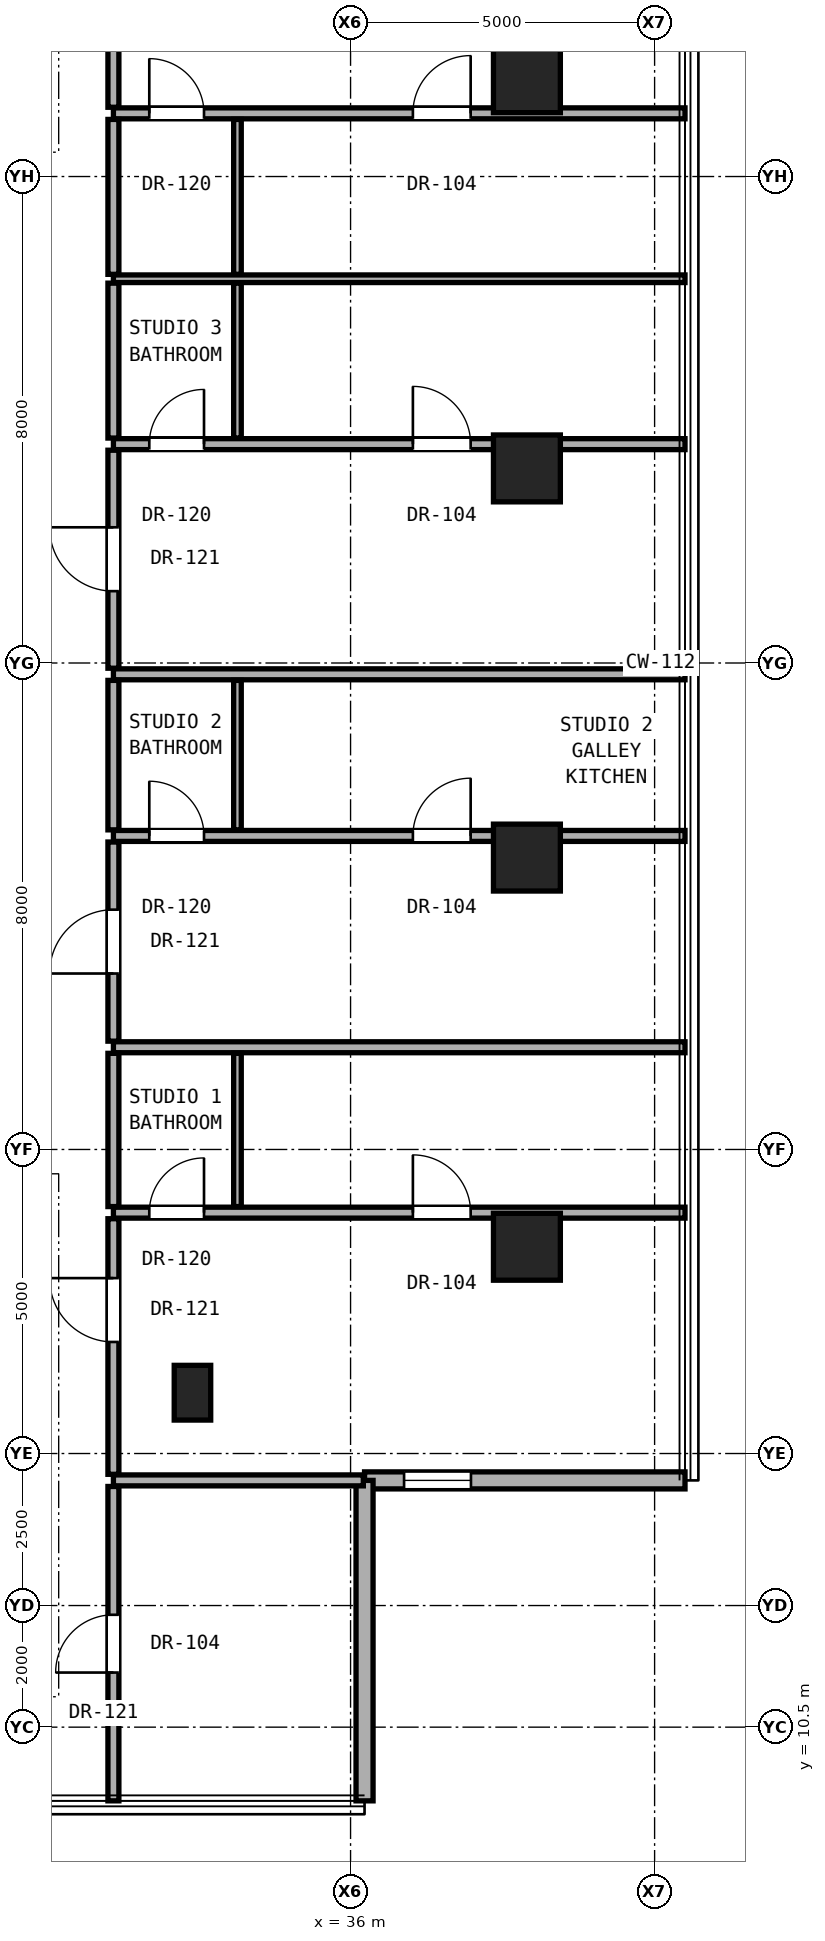
"""IFC4 building model, lengths in metres.
Left out: names, types, materials, properties, quantities, classifications, styles, units other than length and angle.
Written with IfcOpenShell. Run it as: python <this file> out.ifc"""

import sys

from ifc_helpers import new_model, si_unit, direction, frame, frame_2d, origin, origin_2d, place, context, subcontext, project, spatial, rectangle, hollow_rectangle, extrude, element, fill, save


model = new_model("IFC4")
c1 = context("Model", 3, precision=1e-05, world=origin(), true_north=direction((0.0, 1.0)))
c2 = subcontext(c1, "Body", "Model", "MODEL_VIEW")
j1 = project(units=[si_unit("LENGTHUNIT", "METRE"), si_unit("PLANEANGLEUNIT", "RADIAN")], contexts=[c1])
p1 = place(None, origin())
s1 = spatial("IfcSite", under=j1, at=p1, CompositionType="ELEMENT")
p2 = place(p1, origin())
s2 = spatial("IfcBuilding", under=s1, at=p2, CompositionType="ELEMENT")
p3 = place(p2, frame((0.0, 0.0, 131.3)))
s3 = spatial("IfcBuildingStorey", under=s2, at=p3, CompositionType="ELEMENT", Elevation=131.3)
for number, where, z_axis, x_axis in (
    (1, (38.9, 18.4, 0.0), (0.0, 0.0, 1.0), (1.0, 0.0, 0.0)),
    (2, (38.9, 24.8, 0.0), (0.0, 0.0, 1.0), (1.0, 0.0, 0.0)),
    (3, (38.9, 31.2, 0.0), (0.0, 0.0, 1.0), (1.0, 0.0, 0.0)),
    (4, (38.9, 37.6, 0.0), (0.0, 0.0, 1.0), (1.0, 0.0, 0.0)),
):
    element("IfcColumn", number, at=place(p3, frame(where, z_axis=z_axis, x_axis=x_axis)), inside=s3, PredefinedType="COLUMN", context=c2, shape_type="SweptSolid", body=[
        extrude(hollow_rectangle(XDim=1.1, YDim=1.1, WallThickness=0.06, at=origin_2d()), origin(), (0.0, 0.0, 1.0), 3.3),
    ])
p4 = place(p3, frame((33.4, 16.0, 0.0), z_axis=(0.0, 0.0, 1.0), x_axis=(1.0, 0.0, 0.0)))
e5 = element("IfcColumn", 5, at=p4, inside=s3, PredefinedType="PILASTER", context=c2, shape_type="SweptSolid", body=[
    extrude(rectangle(XDim=0.6, YDim=0.9, at=origin_2d()), origin(), (0.0, 0.0, 1.0), 3.3),
])
p5 = place(p3, frame((36.23, 14.558, 0.0), z_axis=(0.0, 0.0, 1.0), x_axis=(1.0, 0.0, 0.0)))
e6 = element("IfcWall", 6, at=p5, inside=s3, PredefinedType="SOLIDWALL", context=c2, shape_type="SweptSolid", body=[
    extrude(rectangle(XDim=5.27, YDim=0.28, at=frame_2d((2.635, 0.0))), origin(), (0.0, 0.0, 1.0), 3.06),
])
p6 = place(p5, frame((0.65, 0.0, 0.85)))
e7 = element("IfcOpeningElement", 7, at=p6, cuts=e6, PredefinedType="OPENING", context=c2, shape_type="SweptSolid", body=[
    extrude(rectangle(XDim=1.1, YDim=2.0, at=frame_2d((0.55, 1.0))), frame((0.0, 0.15, 0.0), z_axis=(0.0, -1.0, 0.0), x_axis=(1.0, 0.0, 0.0)), (0.0, 0.0, 1.0), 0.3),
])
p7 = place(p3, frame((36.23, 9.288, 0.0), z_axis=(0.0, 0.0, 1.0), x_axis=(0.0, 1.0, 0.0)))
e8 = element("IfcWall", 8, at=p7, inside=s3, PredefinedType="SOLIDWALL", context=c2, shape_type="SweptSolid", body=[
    extrude(rectangle(XDim=5.27, YDim=0.28, at=frame_2d((2.635, 0.0))), origin(), (0.0, 0.0, 1.0), 3.06),
])
p8 = place(p3, frame((32.1, 14.558, 0.0), z_axis=(0.0, 0.0, 1.0), x_axis=(1.0, 0.0, 0.0)))
e9 = element("IfcWall", 9, at=p8, inside=s3, PredefinedType="PARTITIONING", context=c2, shape_type="SweptSolid", body=[
    extrude(rectangle(XDim=4.11, YDim=0.18, at=frame_2d((2.055, 0.0))), origin(), (0.0, 0.0, 1.0), 3.08),
])
p9 = place(p3, frame((32.1, 18.961, 0.0), z_axis=(0.0, 0.0, 1.0), x_axis=(1.0, 0.0, 0.0)))
e10 = element("IfcWall", 10, at=p9, inside=s3, PredefinedType="PARTITIONING", context=c2, shape_type="SweptSolid", body=[
    extrude(rectangle(XDim=9.4, YDim=0.18, at=frame_2d((4.7, 0.0))), origin(), (0.0, 0.0, 1.0), 2.299),
])
p10 = place(p9, frame((4.925, 0.0, 0.0)))
e11 = element("IfcOpeningElement", 11, at=p10, cuts=e10, PredefinedType="OPENING", context=c2, shape_type="SweptSolid", body=[
    extrude(rectangle(XDim=0.95, YDim=2.15, at=frame_2d((0.475, 1.075))), frame((0.0, 0.1, 0.0), z_axis=(0.0, -1.0, 0.0), x_axis=(1.0, 0.0, 0.0)), (0.0, 0.0, 1.0), 0.2),
])
p11 = place(p9, frame((0.59, 0.0, 0.0)))
e12 = element("IfcOpeningElement", 12, at=p11, cuts=e10, PredefinedType="OPENING", context=c2, shape_type="SweptSolid", body=[
    extrude(rectangle(XDim=0.9, YDim=2.1, at=frame_2d((0.45, 1.05))), frame((0.0, 0.1, 0.0), z_axis=(0.0, -1.0, 0.0), x_axis=(1.0, 0.0, 0.0)), (0.0, 0.0, 1.0), 0.2),
])
p12 = place(p3, frame((32.1, 21.681, 0.0), z_axis=(0.0, 0.0, 1.0), x_axis=(1.0, 0.0, 0.0)))
e13 = element("IfcWall", 13, at=p12, inside=s3, PredefinedType="PARTITIONING", context=c2, shape_type="SweptSolid", body=[
    extrude(rectangle(XDim=9.4, YDim=0.18, at=frame_2d((4.7, 0.0))), origin(), (0.0, 0.0, 1.0), 2.299),
])
p13 = place(p3, frame((32.1, 25.156, 0.0), z_axis=(0.0, 0.0, 1.0), x_axis=(1.0, 0.0, 0.0)))
e14 = element("IfcWall", 14, at=p13, inside=s3, PredefinedType="PARTITIONING", context=c2, shape_type="SweptSolid", body=[
    extrude(rectangle(XDim=9.4, YDim=0.18, at=frame_2d((4.7, 0.0))), origin(), (0.0, 0.0, 1.0), 2.299),
])
p14 = place(p13, frame((4.925, 0.0, 0.0)))
e15 = element("IfcOpeningElement", 15, at=p14, cuts=e14, PredefinedType="OPENING", context=c2, shape_type="SweptSolid", body=[
    extrude(rectangle(XDim=0.95, YDim=2.15, at=frame_2d((0.475, 1.075))), frame((0.0, 0.1, 0.0), z_axis=(0.0, -1.0, 0.0), x_axis=(1.0, 0.0, 0.0)), (0.0, 0.0, 1.0), 0.2),
])
p15 = place(p13, frame((0.59, 0.0, 0.0)))
e16 = element("IfcOpeningElement", 16, at=p15, cuts=e14, PredefinedType="OPENING", context=c2, shape_type="SweptSolid", body=[
    extrude(rectangle(XDim=0.9, YDim=2.1, at=frame_2d((0.45, 1.05))), frame((0.0, 0.1, 0.0), z_axis=(0.0, -1.0, 0.0), x_axis=(1.0, 0.0, 0.0)), (0.0, 0.0, 1.0), 0.2),
])
p16 = place(p3, frame((32.1, 27.814, 0.0), z_axis=(0.0, 0.0, 1.0), x_axis=(1.0, 0.0, 0.0)))
e17 = element("IfcWall", 17, at=p16, inside=s3, PredefinedType="PARTITIONING", context=c2, shape_type="SweptSolid", body=[
    extrude(rectangle(XDim=9.4, YDim=0.18, at=frame_2d((4.7, 0.0))), origin(), (0.0, 0.0, 1.0), 2.299),
])
p17 = place(p3, frame((32.1, 31.599, 0.0), z_axis=(0.0, 0.0, 1.0), x_axis=(1.0, 0.0, 0.0)))
e18 = element("IfcWall", 18, at=p17, inside=s3, PredefinedType="PARTITIONING", context=c2, shape_type="SweptSolid", body=[
    extrude(rectangle(XDim=9.4, YDim=0.18, at=frame_2d((4.7, 0.0))), origin(), (0.0, 0.0, 1.0), 2.299),
])
p18 = place(p17, frame((4.925, 0.0, 0.0)))
e19 = element("IfcOpeningElement", 19, at=p18, cuts=e18, PredefinedType="OPENING", context=c2, shape_type="SweptSolid", body=[
    extrude(rectangle(XDim=0.95, YDim=2.15, at=frame_2d((0.475, 1.075))), frame((0.0, 0.1, 0.0), z_axis=(0.0, -1.0, 0.0), x_axis=(1.0, 0.0, 0.0)), (0.0, 0.0, 1.0), 0.2),
])
p19 = place(p17, frame((0.59, 0.0, 0.0)))
e20 = element("IfcOpeningElement", 20, at=p19, cuts=e18, PredefinedType="OPENING", context=c2, shape_type="SweptSolid", body=[
    extrude(rectangle(XDim=0.9, YDim=2.1, at=frame_2d((0.45, 1.05))), frame((0.0, 0.1, 0.0), z_axis=(0.0, -1.0, 0.0), x_axis=(1.0, 0.0, 0.0)), (0.0, 0.0, 1.0), 0.2),
])
p20 = place(p3, frame((32.1, 34.319, 0.0), z_axis=(0.0, 0.0, 1.0), x_axis=(1.0, 0.0, 0.0)))
e21 = element("IfcWall", 21, at=p20, inside=s3, PredefinedType="PARTITIONING", context=c2, shape_type="SweptSolid", body=[
    extrude(rectangle(XDim=9.4, YDim=0.125, at=frame_2d((4.7, 0.0))), origin(), (0.0, 0.0, 1.0), 2.299),
])
p21 = place(p3, frame((32.1, 37.039, 0.0), z_axis=(0.0, 0.0, 1.0), x_axis=(1.0, 0.0, 0.0)))
e22 = element("IfcWall", 22, at=p21, inside=s3, PredefinedType="PARTITIONING", context=c2, shape_type="SweptSolid", body=[
    extrude(rectangle(XDim=9.4, YDim=0.18, at=frame_2d((4.7, 0.0))), origin(), (0.0, 0.0, 1.0), 2.299),
])
p22 = place(p21, frame((4.925, 0.0, 0.0)))
e23 = element("IfcOpeningElement", 23, at=p22, cuts=e22, PredefinedType="OPENING", context=c2, shape_type="SweptSolid", body=[
    extrude(rectangle(XDim=0.95, YDim=2.15, at=frame_2d((0.475, 1.075))), frame((0.0, 0.1, 0.0), z_axis=(0.0, -1.0, 0.0), x_axis=(1.0, 0.0, 0.0)), (0.0, 0.0, 1.0), 0.2),
])
p23 = place(p21, frame((0.59, 0.0, 0.0)))
e24 = element("IfcOpeningElement", 24, at=p23, cuts=e22, PredefinedType="OPENING", context=c2, shape_type="SweptSolid", body=[
    extrude(rectangle(XDim=0.9, YDim=2.1, at=frame_2d((0.45, 1.05))), frame((0.0, 0.1, 0.0), z_axis=(0.0, -1.0, 0.0), x_axis=(1.0, 0.0, 0.0)), (0.0, 0.0, 1.0), 0.2),
])
p24 = place(p3, frame((32.1, 9.288, 0.0), z_axis=(0.0, 0.0, 1.0), x_axis=(0.0, 1.0, 0.0)))
e25 = element("IfcWall", 25, at=p24, inside=s3, PredefinedType="PARTITIONING", context=c2, shape_type="SweptSolid", body=[
    extrude(rectangle(XDim=5.17, YDim=0.18, at=frame_2d((2.585, 0.0))), origin(), (0.0, 0.0, 1.0), 3.08),
])
p25 = place(p24, frame((2.11, 0.0, 0.0)))
e26 = element("IfcOpeningElement", 26, at=p25, cuts=e25, PredefinedType="OPENING", context=c2, shape_type="SweptSolid", body=[
    extrude(rectangle(XDim=0.95, YDim=2.15, at=frame_2d((0.475, 1.075))), frame((0.0, 0.1, 0.0), z_axis=(0.0, -1.0, 0.0), x_axis=(1.0, 0.0, 0.0)), (0.0, 0.0, 1.0), 0.2),
])
p26 = place(p3, frame((32.1, 14.658, 0.0), z_axis=(0.0, 0.0, 1.0), x_axis=(0.0, 1.0, 0.0)))
e27 = element("IfcWall", 27, at=p26, inside=s3, PredefinedType="PARTITIONING", context=c2, shape_type="SweptSolid", body=[
    extrude(rectangle(XDim=4.203, YDim=0.18, at=frame_2d((2.102, 0.0))), origin(), (0.0, 0.0, 1.0), 2.456),
])
p27 = place(p26, frame((2.177, 0.0, 0.0)))
e28 = element("IfcOpeningElement", 28, at=p27, cuts=e27, PredefinedType="OPENING", context=c2, shape_type="SweptSolid", body=[
    extrude(rectangle(XDim=1.05, YDim=2.2, at=frame_2d((0.525, 1.1))), frame((0.0, 0.1, 0.0), z_axis=(0.0, -1.0, 0.0), x_axis=(1.0, 0.0, 0.0)), (0.0, 0.0, 1.0), 0.2),
])
p28 = place(p3, frame((32.1, 19.061, 0.0), z_axis=(0.0, 0.0, 1.0), x_axis=(0.0, 1.0, 0.0)))
e29 = element("IfcWall", 29, at=p28, inside=s3, PredefinedType="PARTITIONING", context=c2, shape_type="SweptSolid", body=[
    extrude(rectangle(XDim=2.52, YDim=0.18, at=frame_2d((1.26, 0.0))), origin(), (0.0, 0.0, 1.0), 3.08),
])
p29 = place(p3, frame((32.1, 21.781, 0.0), z_axis=(0.0, 0.0, 1.0), x_axis=(0.0, 1.0, 0.0)))
e30 = element("IfcWall", 30, at=p29, inside=s3, PredefinedType="PARTITIONING", context=c2, shape_type="SweptSolid", body=[
    extrude(rectangle(XDim=3.275, YDim=0.18, at=frame_2d((1.637, 0.0))), origin(), (0.0, 0.0, 1.0), 2.299),
])
p30 = place(p29, frame((1.113, 0.0, 0.0)))
e31 = element("IfcOpeningElement", 31, at=p30, cuts=e30, PredefinedType="OPENING", context=c2, shape_type="SweptSolid", body=[
    extrude(rectangle(XDim=1.05, YDim=2.2, at=frame_2d((0.525, 1.1))), frame((0.0, 0.1, 0.0), z_axis=(0.0, -1.0, 0.0), x_axis=(1.0, 0.0, 0.0)), (0.0, 0.0, 1.0), 0.2),
])
p31 = place(p3, frame((32.1, 25.256, 0.0), z_axis=(0.0, 0.0, 1.0), x_axis=(0.0, 1.0, 0.0)))
e32 = element("IfcWall", 32, at=p31, inside=s3, PredefinedType="PARTITIONING", context=c2, shape_type="SweptSolid", body=[
    extrude(rectangle(XDim=2.458, YDim=0.18, at=frame_2d((1.229, 0.0))), origin(), (0.0, 0.0, 1.0), 3.08),
])
p32 = place(p3, frame((32.1, 27.914, 0.0), z_axis=(0.0, 0.0, 1.0), x_axis=(0.0, 1.0, 0.0)))
e33 = element("IfcWall", 33, at=p32, inside=s3, PredefinedType="PARTITIONING", context=c2, shape_type="SweptSolid", body=[
    extrude(rectangle(XDim=3.585, YDim=0.18, at=frame_2d((1.792, 0.0))), origin(), (0.0, 0.0, 1.0), 2.299),
])
p33 = place(p32, frame((1.268, 0.0, 0.0)))
e34 = element("IfcOpeningElement", 34, at=p33, cuts=e33, PredefinedType="OPENING", context=c2, shape_type="SweptSolid", body=[
    extrude(rectangle(XDim=1.05, YDim=2.2, at=frame_2d((0.525, 1.1))), frame((0.0, 0.1, 0.0), z_axis=(0.0, -1.0, 0.0), x_axis=(1.0, 0.0, 0.0)), (0.0, 0.0, 1.0), 0.2),
])
p34 = place(p3, frame((32.1, 31.699, 0.0), z_axis=(0.0, 0.0, 1.0), x_axis=(0.0, 1.0, 0.0)))
e35 = element("IfcWall", 35, at=p34, inside=s3, PredefinedType="PARTITIONING", context=c2, shape_type="SweptSolid", body=[
    extrude(rectangle(XDim=2.548, YDim=0.18, at=frame_2d((1.274, 0.0))), origin(), (0.0, 0.0, 1.0), 3.08),
])
p35 = place(p3, frame((32.1, 34.392, 0.0), z_axis=(0.0, 0.0, 1.0), x_axis=(0.0, 1.0, 0.0)))
e36 = element("IfcWall", 36, at=p35, inside=s3, PredefinedType="PARTITIONING", context=c2, shape_type="SweptSolid", body=[
    extrude(rectangle(XDim=2.547, YDim=0.18, at=frame_2d((1.274, 0.0))), origin(), (0.0, 0.0, 1.0), 3.08),
])
p36 = place(p3, frame((32.1, 37.139, 0.0), z_axis=(0.0, 0.0, 1.0), x_axis=(0.0, 1.0, 0.0)))
e37 = element("IfcWall", 37, at=p36, inside=s3, PredefinedType="PARTITIONING", context=c2, shape_type="SweptSolid", body=[
    extrude(rectangle(XDim=4.203, YDim=0.18, at=frame_2d((2.102, 0.0))), origin(), (0.0, 0.0, 1.0), 2.456),
])
p37 = place(p36, frame((0.977, 0.0, 0.0)))
e38 = element("IfcOpeningElement", 38, at=p37, cuts=e37, PredefinedType="OPENING", context=c2, shape_type="SweptSolid", body=[
    extrude(rectangle(XDim=1.05, YDim=2.2, at=frame_2d((0.525, 1.1))), frame((0.0, 0.1, 0.0), z_axis=(0.0, -1.0, 0.0), x_axis=(1.0, 0.0, 0.0)), (0.0, 0.0, 1.0), 0.2),
])
p38 = place(p3, frame((34.14, 19.061, 0.0), z_axis=(0.0, 0.0, 1.0), x_axis=(0.0, 1.0, 0.0)))
e39 = element("IfcWall", 39, at=p38, inside=s3, PredefinedType="PARTITIONING", context=c2, shape_type="SweptSolid", body=[
    extrude(rectangle(XDim=2.52, YDim=0.125, at=frame_2d((1.26, 0.0))), origin(), (0.0, 0.0, 1.0), 3.08),
])
p39 = place(p3, frame((34.14, 25.256, 0.0), z_axis=(0.0, 0.0, 1.0), x_axis=(0.0, 1.0, 0.0)))
e40 = element("IfcWall", 40, at=p39, inside=s3, PredefinedType="PARTITIONING", context=c2, shape_type="SweptSolid", body=[
    extrude(rectangle(XDim=2.458, YDim=0.125, at=frame_2d((1.229, 0.0))), origin(), (0.0, 0.0, 1.0), 3.08),
])
p40 = place(p3, frame((34.14, 31.699, 0.0), z_axis=(0.0, 0.0, 1.0), x_axis=(0.0, 1.0, 0.0)))
e41 = element("IfcWall", 41, at=p40, inside=s3, PredefinedType="PARTITIONING", context=c2, shape_type="SweptSolid", body=[
    extrude(rectangle(XDim=2.548, YDim=0.125, at=frame_2d((1.274, 0.0))), origin(), (0.0, 0.0, 1.0), 3.08),
])
p41 = place(p3, frame((34.14, 34.392, 0.0), z_axis=(0.0, 0.0, 1.0), x_axis=(0.0, 1.0, 0.0)))
e42 = element("IfcWall", 42, at=p41, inside=s3, PredefinedType="PARTITIONING", context=c2, shape_type="SweptSolid", body=[
    extrude(rectangle(XDim=2.547, YDim=0.125, at=frame_2d((1.274, 0.0))), origin(), (0.0, 0.0, 1.0), 3.08),
])
p42 = place(p6, origin())
e43 = element("IfcWindow", 43, at=p42, inside=s3, PartitioningType="SINGLE_PANEL", PredefinedType="WINDOW", context=c2, shape_type="SweptSolid", body=[
    extrude(rectangle(XDim=1.1, YDim=2.0, at=frame_2d((0.55, 1.0))), frame((0.0, 0.03, 0.0), z_axis=(0.0, -1.0, 0.0), x_axis=(1.0, 0.0, 0.0)), (0.0, 0.0, 1.0), 0.06),
])
fill(e7, e43)
p43 = place(p27, origin())
e44 = element("IfcDoor", 44, at=p43, inside=s3, OperationType="SINGLE_SWING_RIGHT", PredefinedType="DOOR", context=c2, shape_type="SweptSolid", body=[
    extrude(rectangle(XDim=1.05, YDim=2.2, at=frame_2d((0.525, 1.1))), frame((0.0, 0.025, 0.0), z_axis=(0.0, -1.0, 0.0), x_axis=(1.0, 0.0, 0.0)), (0.0, 0.0, 1.0), 0.05),
])
fill(e28, e44)
p44 = place(p10, origin())
e45 = element("IfcDoor", 45, at=p44, inside=s3, OperationType="SINGLE_SWING_LEFT", PredefinedType="DOOR", context=c2, shape_type="SweptSolid", body=[
    extrude(rectangle(XDim=0.95, YDim=2.15, at=frame_2d((0.475, 1.075))), frame((0.0, 0.025, 0.0), z_axis=(0.0, -1.0, 0.0), x_axis=(1.0, 0.0, 0.0)), (0.0, 0.0, 1.0), 0.05),
])
fill(e11, e45)
p45 = place(p11, origin())
e46 = element("IfcDoor", 46, at=p45, inside=s3, OperationType="SINGLE_SWING_RIGHT", PredefinedType="DOOR", context=c2, shape_type="SweptSolid", body=[
    extrude(rectangle(XDim=0.9, YDim=2.1, at=frame_2d((0.45, 1.05))), frame((0.0, 0.025, 0.0), z_axis=(0.0, -1.0, 0.0), x_axis=(1.0, 0.0, 0.0)), (0.0, 0.0, 1.0), 0.05),
])
fill(e12, e46)
p46 = place(p30, origin())
e47 = element("IfcDoor", 47, at=p46, inside=s3, OperationType="SINGLE_SWING_LEFT", PredefinedType="DOOR", context=c2, shape_type="SweptSolid", body=[
    extrude(rectangle(XDim=1.05, YDim=2.2, at=frame_2d((0.525, 1.1))), frame((0.0, 0.025, 0.0), z_axis=(0.0, -1.0, 0.0), x_axis=(1.0, 0.0, 0.0)), (0.0, 0.0, 1.0), 0.05),
])
fill(e31, e47)
p47 = place(p14, origin())
e48 = element("IfcDoor", 48, at=p47, inside=s3, OperationType="SINGLE_SWING_RIGHT", PredefinedType="DOOR", context=c2, shape_type="SweptSolid", body=[
    extrude(rectangle(XDim=0.95, YDim=2.15, at=frame_2d((0.475, 1.075))), frame((0.0, 0.025, 0.0), z_axis=(0.0, -1.0, 0.0), x_axis=(1.0, 0.0, 0.0)), (0.0, 0.0, 1.0), 0.05),
])
fill(e15, e48)
p48 = place(p15, origin())
e49 = element("IfcDoor", 49, at=p48, inside=s3, OperationType="SINGLE_SWING_LEFT", PredefinedType="DOOR", context=c2, shape_type="SweptSolid", body=[
    extrude(rectangle(XDim=0.9, YDim=2.1, at=frame_2d((0.45, 1.05))), frame((0.0, 0.025, 0.0), z_axis=(0.0, -1.0, 0.0), x_axis=(1.0, 0.0, 0.0)), (0.0, 0.0, 1.0), 0.05),
])
fill(e16, e49)
p49 = place(p33, origin())
e50 = element("IfcDoor", 50, at=p49, inside=s3, OperationType="SINGLE_SWING_RIGHT", PredefinedType="DOOR", context=c2, shape_type="SweptSolid", body=[
    extrude(rectangle(XDim=1.05, YDim=2.2, at=frame_2d((0.525, 1.1))), frame((0.0, 0.025, 0.0), z_axis=(0.0, -1.0, 0.0), x_axis=(1.0, 0.0, 0.0)), (0.0, 0.0, 1.0), 0.05),
])
fill(e34, e50)
p50 = place(p18, origin())
e51 = element("IfcDoor", 51, at=p50, inside=s3, OperationType="SINGLE_SWING_LEFT", PredefinedType="DOOR", context=c2, shape_type="SweptSolid", body=[
    extrude(rectangle(XDim=0.95, YDim=2.15, at=frame_2d((0.475, 1.075))), frame((0.0, 0.025, 0.0), z_axis=(0.0, -1.0, 0.0), x_axis=(1.0, 0.0, 0.0)), (0.0, 0.0, 1.0), 0.05),
])
fill(e19, e51)
p51 = place(p19, origin())
e52 = element("IfcDoor", 52, at=p51, inside=s3, OperationType="SINGLE_SWING_RIGHT", PredefinedType="DOOR", context=c2, shape_type="SweptSolid", body=[
    extrude(rectangle(XDim=0.9, YDim=2.1, at=frame_2d((0.45, 1.05))), frame((0.0, 0.025, 0.0), z_axis=(0.0, -1.0, 0.0), x_axis=(1.0, 0.0, 0.0)), (0.0, 0.0, 1.0), 0.05),
])
fill(e20, e52)
p52 = place(p22, origin())
e53 = element("IfcDoor", 53, at=p52, inside=s3, OperationType="SINGLE_SWING_RIGHT", PredefinedType="DOOR", context=c2, shape_type="SweptSolid", body=[
    extrude(rectangle(XDim=0.95, YDim=2.15, at=frame_2d((0.475, 1.075))), frame((0.0, 0.025, 0.0), z_axis=(0.0, -1.0, 0.0), x_axis=(1.0, 0.0, 0.0)), (0.0, 0.0, 1.0), 0.05),
])
fill(e23, e53)
p53 = place(p23, origin())
e54 = element("IfcDoor", 54, at=p53, inside=s3, OperationType="SINGLE_SWING_LEFT", PredefinedType="DOOR", context=c2, shape_type="SweptSolid", body=[
    extrude(rectangle(XDim=0.9, YDim=2.1, at=frame_2d((0.45, 1.05))), frame((0.0, 0.025, 0.0), z_axis=(0.0, -1.0, 0.0), x_axis=(1.0, 0.0, 0.0)), (0.0, 0.0, 1.0), 0.05),
])
fill(e24, e54)
p54 = place(p25, origin())
e55 = element("IfcDoor", 55, at=p54, inside=s3, OperationType="SINGLE_SWING_LEFT", PredefinedType="DOOR", context=c2, shape_type="SweptSolid", body=[
    extrude(rectangle(XDim=0.95, YDim=2.15, at=frame_2d((0.475, 1.075))), frame((0.0, 0.025, 0.0), z_axis=(0.0, -1.0, 0.0), x_axis=(1.0, 0.0, 0.0)), (0.0, 0.0, 1.0), 0.05),
])
fill(e26, e55)
save(model, sys.argv[1])
